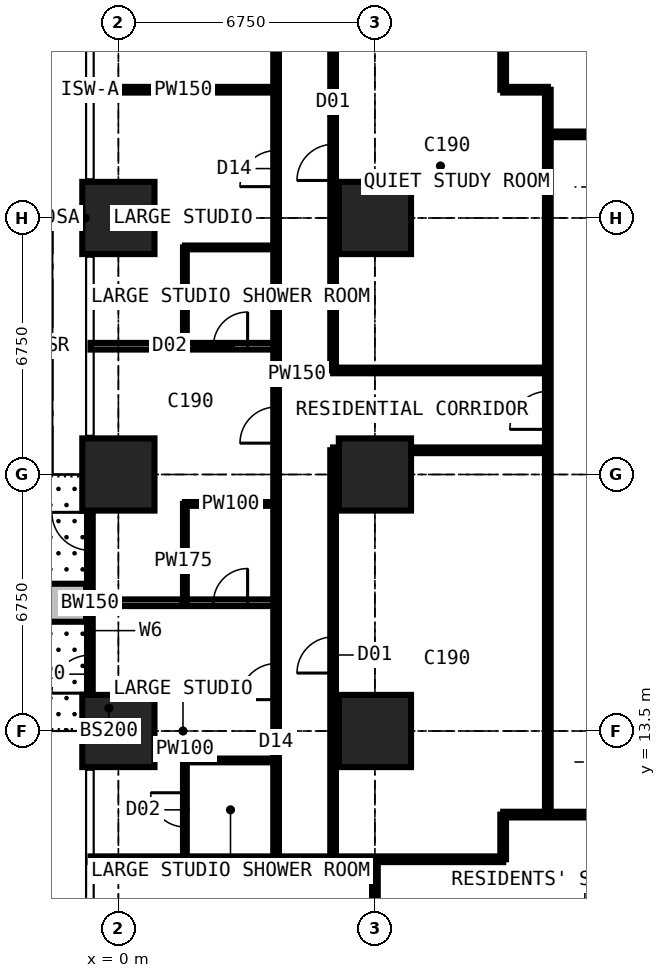
"""IFC4 building model, lengths in metres.
Left out: names, types, materials, properties, quantities, classifications, styles, units other than length and angle.
Written with IfcOpenShell. Run it as: python <this file> out.ifc"""

import sys

from ifc_helpers import new_model, si_unit, direction, frame, frame_2d, origin, origin_2d, place, context, subcontext, project, spatial, rectangle, extrude, element, fill, save


model = new_model("IFC4")
c1 = context("Model", 3, precision=1e-05, world=origin(), true_north=direction((0.0, 1.0)))
c2 = subcontext(c1, "Body", "Model", "MODEL_VIEW")
j1 = project(units=[si_unit("LENGTHUNIT", "METRE"), si_unit("PLANEANGLEUNIT", "RADIAN")], contexts=[c1])
p1 = place(None, origin())
s1 = spatial("IfcSite", under=j1, at=p1, CompositionType="ELEMENT")
p2 = place(p1, origin())
s2 = spatial("IfcBuilding", under=s1, at=p2, CompositionType="ELEMENT")
p3 = place(p2, frame((0.0, 0.0, 39.6)))
s3 = spatial("IfcBuildingStorey", under=s2, at=p3, CompositionType="ELEMENT", Elevation=39.6)
for number, where, z_axis, x_axis in (
    (1, (0.0, 13.5, 0.0), (0.0, 0.0, 1.0), (1.0, 0.0, 0.0)),
    (2, (0.0, 20.25, 0.0), (0.0, 0.0, 1.0), (1.0, 0.0, 0.0)),
    (3, (0.0, 27.0, 0.0), (0.0, 0.0, 1.0), (1.0, 0.0, 0.0)),
    (4, (6.75, 13.5, 0.0), (0.0, 0.0, 1.0), (1.0, 0.0, 0.0)),
    (5, (6.75, 20.25, 0.0), (0.0, 0.0, 1.0), (1.0, 0.0, 0.0)),
    (6, (6.75, 27.0, 0.0), (0.0, 0.0, 1.0), (1.0, 0.0, 0.0)),
):
    element("IfcColumn", number, at=place(p3, frame(where, z_axis=z_axis, x_axis=x_axis)), inside=s3, PredefinedType="COLUMN", context=c2, shape_type="SweptSolid", body=[
        extrude(rectangle(XDim=1.9, YDim=1.9, at=origin_2d()), origin(), (0.0, 0.0, 1.0), 3.6),
    ])
p4 = place(p3, frame((-0.75, 13.5, 0.0), z_axis=(0.0, 0.0, 1.0), x_axis=(0.0, 1.0, 0.0)))
e7 = element("IfcWall", 7, at=p4, inside=s3, PredefinedType="SOLIDWALL", context=c2, shape_type="SweptSolid", body=[
    extrude(rectangle(XDim=6.75, YDim=0.15, at=frame_2d((3.375, 0.0))), origin(), (0.0, 0.0, 1.0), 3.375),
])
p5 = place(p4, frame((0.996, 0.0, 0.0)))
e8 = element("IfcOpeningElement", 8, at=p5, cuts=e7, PredefinedType="OPENING", context=c2, shape_type="SweptSolid", body=[
    extrude(rectangle(XDim=1.0, YDim=2.2, at=frame_2d((0.5, 1.1))), frame((0.0, 0.085, 0.0), z_axis=(0.0, -1.0, 0.0), x_axis=(1.0, 0.0, 0.0)), (0.0, 0.0, 1.0), 0.17),
])
p6 = place(p4, frame((2.042, 0.0, 0.9)))
e9 = element("IfcOpeningElement", 9, at=p6, cuts=e7, PredefinedType="OPENING", context=c2, shape_type="SweptSolid", body=[
    extrude(rectangle(XDim=1.2, YDim=1.8, at=frame_2d((0.6, 0.9))), frame((0.0, 0.085, 0.0), z_axis=(0.0, -1.0, 0.0), x_axis=(1.0, 0.0, 0.0)), (0.0, 0.0, 1.0), 0.17),
])
p7 = place(p4, frame((4.754, 0.0, 0.0)))
e10 = element("IfcOpeningElement", 10, at=p7, cuts=e7, PredefinedType="OPENING", context=c2, shape_type="SweptSolid", body=[
    extrude(rectangle(XDim=1.0, YDim=2.2, at=frame_2d((0.5, 1.1))), frame((0.0, 0.085, 0.0), z_axis=(0.0, -1.0, 0.0), x_axis=(1.0, 0.0, 0.0)), (0.0, 0.0, 1.0), 0.17),
])
p8 = place(p4, frame((3.508, 0.0, 0.9)))
e11 = element("IfcOpeningElement", 11, at=p8, cuts=e7, PredefinedType="OPENING", context=c2, shape_type="SweptSolid", body=[
    extrude(rectangle(XDim=1.2, YDim=1.8, at=frame_2d((0.6, 0.9))), frame((0.0, 0.085, 0.0), z_axis=(0.0, -1.0, 0.0), x_axis=(1.0, 0.0, 0.0)), (0.0, 0.0, 1.0), 0.17),
])
p9 = place(p3, frame((-0.85, 16.875, 0.0), z_axis=(0.0, 0.0, 1.0), x_axis=(-1.0, 0.0, 0.0)))
e12 = element("IfcWall", 12, at=p9, inside=s3, PredefinedType="USERDEFINED", context=c2, shape_type="SweptSolid", body=[
    extrude(rectangle(XDim=2.2, YDim=1.0, at=frame_2d((1.1, 0.0))), origin(), (0.0, 0.0, 1.0), 0.9),
])
p10 = place(p3, frame((-0.734, 10.125, 0.0), z_axis=(0.0, 0.0, 1.0), x_axis=(1.0, 0.0, 0.0)))
e13 = element("IfcWall", 13, at=p10, inside=s3, PredefinedType="PARTITIONING", context=c2, shape_type="SweptSolid", body=[
    extrude(rectangle(XDim=10.859, YDim=0.15, at=frame_2d((5.429, 0.0))), origin(), (0.0, 0.0, 1.0), 3.375),
])
p11 = place(p3, frame((-0.734, 16.875, 0.0), z_axis=(0.0, 0.0, 1.0), x_axis=(1.0, 0.0, 0.0)))
e14 = element("IfcWall", 14, at=p11, inside=s3, PredefinedType="PARTITIONING", context=c2, shape_type="SweptSolid", body=[
    extrude(rectangle(XDim=4.884, YDim=0.175, at=frame_2d((2.442, 0.0))), origin(), (0.0, 0.0, 1.0), 3.375),
])
p12 = place(p11, frame((3.234, 0.0, 0.0)))
e15 = element("IfcOpeningElement", 15, at=p12, cuts=e14, PredefinedType="OPENING", context=c2, shape_type="SweptSolid", body=[
    extrude(rectangle(XDim=0.9, YDim=2.2, at=frame_2d((0.45, 1.1))), frame((0.0, 0.097, 0.0), z_axis=(0.0, -1.0, 0.0), x_axis=(1.0, 0.0, 0.0)), (0.0, 0.0, 1.0), 0.195),
])
p13 = place(p3, frame((-0.734, 23.625, 0.0), z_axis=(0.0, 0.0, 1.0), x_axis=(1.0, 0.0, 0.0)))
e16 = element("IfcWall", 16, at=p13, inside=s3, PredefinedType="PARTITIONING", context=c2, shape_type="SweptSolid", body=[
    extrude(rectangle(XDim=4.884, YDim=0.175, at=frame_2d((2.442, 0.0))), origin(), (0.0, 0.0, 1.0), 3.375),
])
p14 = place(p13, frame((3.234, 0.0, 0.0)))
e17 = element("IfcOpeningElement", 17, at=p14, cuts=e16, PredefinedType="OPENING", context=c2, shape_type="SweptSolid", body=[
    extrude(rectangle(XDim=0.9, YDim=2.2, at=frame_2d((0.45, 1.1))), frame((0.0, 0.097, 0.0), z_axis=(0.0, -1.0, 0.0), x_axis=(1.0, 0.0, 0.0)), (0.0, 0.0, 1.0), 0.195),
])
p15 = place(p3, frame((-0.734, 30.375, 0.0), z_axis=(0.0, 0.0, 1.0), x_axis=(1.0, 0.0, 0.0)))
e18 = element("IfcWall", 18, at=p15, inside=s3, PredefinedType="PARTITIONING", context=c2, shape_type="SweptSolid", body=[
    extrude(rectangle(XDim=4.884, YDim=0.15, at=frame_2d((2.442, 0.0))), origin(), (0.0, 0.0, 1.0), 3.375),
])
p16 = place(p3, frame((1.75, 10.125, 0.0), z_axis=(0.0, 0.0, 1.0), x_axis=(0.0, 1.0, 0.0)))
e19 = element("IfcWall", 19, at=p16, inside=s3, PredefinedType="PARTITIONING", context=c2, shape_type="SweptSolid", body=[
    extrude(rectangle(XDim=2.6, YDim=0.1, at=frame_2d((1.3, 0.0))), origin(), (0.0, 0.0, 1.0), 3.375),
])
p17 = place(p16, frame((0.85, 0.0, 0.0)))
e20 = element("IfcOpeningElement", 20, at=p17, cuts=e19, PredefinedType="OPENING", context=c2, shape_type="SweptSolid", body=[
    extrude(rectangle(XDim=0.9, YDim=2.2, at=frame_2d((0.45, 1.1))), frame((0.0, 0.06, 0.0), z_axis=(0.0, -1.0, 0.0), x_axis=(1.0, 0.0, 0.0)), (0.0, 0.0, 1.0), 0.12),
])
p18 = place(p3, frame((1.75, 12.725, 0.0), z_axis=(0.0, 0.0, 1.0), x_axis=(1.0, 0.0, 0.0)))
e21 = element("IfcWall", 21, at=p18, inside=s3, PredefinedType="PARTITIONING", context=c2, shape_type="SweptSolid", body=[
    extrude(rectangle(XDim=2.4, YDim=0.1, at=frame_2d((1.2, 0.0))), origin(), (0.0, 0.0, 1.0), 3.375),
])
p19 = place(p3, frame((1.75, 16.875, 0.0), z_axis=(0.0, 0.0, 1.0), x_axis=(0.0, 1.0, 0.0)))
e22 = element("IfcWall", 22, at=p19, inside=s3, PredefinedType="PARTITIONING", context=c2, shape_type="SweptSolid", body=[
    extrude(rectangle(XDim=2.6, YDim=0.1, at=frame_2d((1.3, 0.0))), origin(), (0.0, 0.0, 1.0), 3.375),
])
p20 = place(p3, frame((1.75, 19.475, 0.0), z_axis=(0.0, 0.0, 1.0), x_axis=(1.0, 0.0, 0.0)))
e23 = element("IfcWall", 23, at=p20, inside=s3, PredefinedType="PARTITIONING", context=c2, shape_type="SweptSolid", body=[
    extrude(rectangle(XDim=2.4, YDim=0.1, at=frame_2d((1.2, 0.0))), origin(), (0.0, 0.0, 1.0), 3.375),
])
p21 = place(p3, frame((1.75, 23.625, 0.0), z_axis=(0.0, 0.0, 1.0), x_axis=(0.0, 1.0, 0.0)))
e24 = element("IfcWall", 24, at=p21, inside=s3, PredefinedType="PARTITIONING", context=c2, shape_type="SweptSolid", body=[
    extrude(rectangle(XDim=2.6, YDim=0.1, at=frame_2d((1.3, 0.0))), origin(), (0.0, 0.0, 1.0), 3.375),
])
p22 = place(p3, frame((1.75, 26.225, 0.0), z_axis=(0.0, 0.0, 1.0), x_axis=(1.0, 0.0, 0.0)))
e25 = element("IfcWall", 25, at=p22, inside=s3, PredefinedType="PARTITIONING", context=c2, shape_type="SweptSolid", body=[
    extrude(rectangle(XDim=2.4, YDim=0.1, at=frame_2d((1.2, 0.0))), origin(), (0.0, 0.0, 1.0), 3.375),
])
p23 = place(p3, frame((4.15, 10.125, 0.0), z_axis=(0.0, 0.0, 1.0), x_axis=(0.0, 1.0, 0.0)))
e26 = element("IfcWall", 26, at=p23, inside=s3, PredefinedType="PARTITIONING", context=c2, shape_type="SweptSolid", body=[
    extrude(rectangle(XDim=23.625, YDim=0.15, at=frame_2d((11.812, 0.0))), origin(), (0.0, 0.0, 1.0), 3.375),
])
p24 = place(p23, frame((4.2, 0.0, 0.0)))
e27 = element("IfcOpeningElement", 27, at=p24, cuts=e26, PredefinedType="OPENING", context=c2, shape_type="SweptSolid", body=[
    extrude(rectangle(XDim=0.95, YDim=2.2, at=frame_2d((0.475, 1.1))), frame((0.0, 0.085, 0.0), z_axis=(0.0, -1.0, 0.0), x_axis=(1.0, 0.0, 0.0)), (0.0, 0.0, 1.0), 0.17),
])
p25 = place(p23, frame((10.95, 0.0, 0.0)))
e28 = element("IfcOpeningElement", 28, at=p25, cuts=e26, PredefinedType="OPENING", context=c2, shape_type="SweptSolid", body=[
    extrude(rectangle(XDim=0.95, YDim=2.2, at=frame_2d((0.475, 1.1))), frame((0.0, 0.085, 0.0), z_axis=(0.0, -1.0, 0.0), x_axis=(1.0, 0.0, 0.0)), (0.0, 0.0, 1.0), 0.17),
])
p26 = place(p23, frame((17.7, 0.0, 0.0)))
e29 = element("IfcOpeningElement", 29, at=p26, cuts=e26, PredefinedType="OPENING", context=c2, shape_type="SweptSolid", body=[
    extrude(rectangle(XDim=0.95, YDim=2.2, at=frame_2d((0.475, 1.1))), frame((0.0, 0.085, 0.0), z_axis=(0.0, -1.0, 0.0), x_axis=(1.0, 0.0, 0.0)), (0.0, 0.0, 1.0), 0.17),
])
p27 = place(p3, frame((5.65, 10.125, 0.0), z_axis=(0.0, 0.0, 1.0), x_axis=(0.0, 1.0, 0.0)))
e30 = element("IfcWall", 30, at=p27, inside=s3, PredefinedType="PARTITIONING", context=c2, shape_type="SweptSolid", body=[
    extrude(rectangle(XDim=10.762, YDim=0.15, at=frame_2d((5.381, 0.0))), origin(), (0.0, 0.0, 1.0), 3.375),
])
p28 = place(p27, frame((4.9, 0.0, 0.0)))
e31 = element("IfcOpeningElement", 31, at=p28, cuts=e30, PredefinedType="OPENING", context=c2, shape_type="SweptSolid", body=[
    extrude(rectangle(XDim=0.95, YDim=2.2, at=frame_2d((0.475, 1.1))), frame((0.0, 0.085, 0.0), z_axis=(0.0, -1.0, 0.0), x_axis=(1.0, 0.0, 0.0)), (0.0, 0.0, 1.0), 0.17),
])
p29 = place(p3, frame((5.65, 20.887, 0.0), z_axis=(0.0, 0.0, 1.0), x_axis=(1.0, 0.0, 0.0)))
e32 = element("IfcWall", 32, at=p29, inside=s3, PredefinedType="PARTITIONING", context=c2, shape_type="SweptSolid", body=[
    extrude(rectangle(XDim=5.65, YDim=0.15, at=frame_2d((2.825, 0.0))), origin(), (0.0, 0.0, 1.0), 3.375),
])
p30 = place(p3, frame((5.65, 22.988, 0.0), z_axis=(0.0, 0.0, 1.0), x_axis=(0.0, 1.0, 0.0)))
e33 = element("IfcWall", 33, at=p30, inside=s3, PredefinedType="PARTITIONING", context=c2, shape_type="SweptSolid", body=[
    extrude(rectangle(XDim=10.762, YDim=0.15, at=frame_2d((5.381, 0.0))), origin(), (0.0, 0.0, 1.0), 3.375),
])
p31 = place(p30, frame((5.0, 0.0, 0.0)))
e34 = element("IfcOpeningElement", 34, at=p31, cuts=e33, PredefinedType="OPENING", context=c2, shape_type="SweptSolid", body=[
    extrude(rectangle(XDim=0.95, YDim=2.2, at=frame_2d((0.475, 1.1))), frame((0.0, 0.085, 0.0), z_axis=(0.0, -1.0, 0.0), x_axis=(1.0, 0.0, 0.0)), (0.0, 0.0, 1.0), 0.17),
])
p32 = place(p3, frame((5.65, 22.988, 0.0), z_axis=(0.0, 0.0, 1.0), x_axis=(1.0, 0.0, 0.0)))
e35 = element("IfcWall", 35, at=p32, inside=s3, PredefinedType="PARTITIONING", context=c2, shape_type="SweptSolid", body=[
    extrude(rectangle(XDim=5.65, YDim=0.15, at=frame_2d((2.825, 0.0))), origin(), (0.0, 0.0, 1.0), 3.375),
])
p33 = place(p3, frame((6.75, 4.15, 0.0), z_axis=(0.0, 0.0, 1.0), x_axis=(0.0, 1.0, 0.0)))
e36 = element("IfcWall", 36, at=p33, inside=s3, PredefinedType="PARTITIONING", context=c2, shape_type="SweptSolid", body=[
    extrude(rectangle(XDim=5.975, YDim=0.15, at=frame_2d((2.988, 0.0))), origin(), (0.0, 0.0, 1.0), 2.877),
])
p34 = place(p3, frame((10.125, 10.125, 0.0), z_axis=(0.0, 0.0, 1.0), x_axis=(0.0, 1.0, 0.0)))
e37 = element("IfcWall", 37, at=p34, inside=s3, PredefinedType="PARTITIONING", context=c2, shape_type="SweptSolid", body=[
    extrude(rectangle(XDim=1.175, YDim=0.15, at=frame_2d((0.587, 0.0))), origin(), (0.0, 0.0, 1.0), 3.375),
])
p35 = place(p3, frame((10.125, 11.3, 0.0), z_axis=(0.0, 0.0, 1.0), x_axis=(1.0, 0.0, 0.0)))
e38 = element("IfcWall", 38, at=p35, inside=s3, PredefinedType="PARTITIONING", context=c2, shape_type="SweptSolid", body=[
    extrude(rectangle(XDim=20.675, YDim=0.15, at=frame_2d((10.337, 0.0))), origin(), (0.0, 0.0, 1.0), 3.375),
])
p36 = place(p35, frame((8.375, 0.0, 0.0)))
e39 = element("IfcOpeningElement", 39, at=p36, cuts=e38, PredefinedType="OPENING", context=c2, shape_type="SweptSolid", body=[
    extrude(rectangle(XDim=1.0, YDim=2.2, at=frame_2d((0.5, 1.1))), frame((0.0, 0.085, 0.0), z_axis=(0.0, -1.0, 0.0), x_axis=(1.0, 0.0, 0.0)), (0.0, 0.0, 1.0), 0.17),
])
p37 = place(p35, frame((10.975, 0.0, 0.0)))
e40 = element("IfcOpeningElement", 40, at=p37, cuts=e38, PredefinedType="OPENING", context=c2, shape_type="SweptSolid", body=[
    extrude(rectangle(XDim=1.0, YDim=2.2, at=frame_2d((0.5, 1.1))), frame((0.0, 0.085, 0.0), z_axis=(0.0, -1.0, 0.0), x_axis=(1.0, 0.0, 0.0)), (0.0, 0.0, 1.0), 0.17),
])
p38 = place(p35, frame((3.925, 0.0, 0.0)))
e41 = element("IfcOpeningElement", 41, at=p38, cuts=e38, PredefinedType="OPENING", context=c2, shape_type="SweptSolid", body=[
    extrude(rectangle(XDim=0.95, YDim=2.2, at=frame_2d((0.475, 1.1))), frame((0.0, 0.085, 0.0), z_axis=(0.0, -1.0, 0.0), x_axis=(1.0, 0.0, 0.0)), (0.0, 0.0, 1.0), 0.17),
])
p39 = place(p3, frame((10.125, 30.375, 0.0), z_axis=(0.0, 0.0, 1.0), x_axis=(0.0, 1.0, 0.0)))
e42 = element("IfcWall", 42, at=p39, inside=s3, PredefinedType="PARTITIONING", context=c2, shape_type="SweptSolid", body=[
    extrude(rectangle(XDim=10.859, YDim=0.15, at=frame_2d((5.429, 0.0))), origin(), (0.0, 0.0, 1.0), 3.375),
])
p40 = place(p39, frame((4.725, 0.0, 0.0)))
e43 = element("IfcOpeningElement", 43, at=p40, cuts=e42, PredefinedType="OPENING", context=c2, shape_type="SweptSolid", body=[
    extrude(rectangle(XDim=1.0, YDim=2.2, at=frame_2d((0.5, 1.1))), frame((0.0, 0.085, 0.0), z_axis=(0.0, -1.0, 0.0), x_axis=(1.0, 0.0, 0.0)), (0.0, 0.0, 1.0), 0.17),
])
p41 = place(p3, frame((10.125, 30.375, 0.0), z_axis=(0.0, 0.0, 1.0), x_axis=(1.0, 0.0, 0.0)))
e44 = element("IfcWall", 44, at=p41, inside=s3, PredefinedType="PARTITIONING", context=c2, shape_type="SweptSolid", body=[
    extrude(rectangle(XDim=1.175, YDim=0.15, at=frame_2d((0.587, 0.0))), origin(), (0.0, 0.0, 1.0), 3.375),
])
p42 = place(p3, frame((11.3, 11.3, 0.0), z_axis=(0.0, 0.0, 1.0), x_axis=(0.0, 1.0, 0.0)))
e45 = element("IfcWall", 45, at=p42, inside=s3, PredefinedType="PARTITIONING", context=c2, shape_type="SweptSolid", body=[
    extrude(rectangle(XDim=19.075, YDim=0.15, at=frame_2d((9.538, 0.0))), origin(), (0.0, 0.0, 1.0), 3.375),
])
p43 = place(p42, frame((10.137, 0.0, 0.0)))
e46 = element("IfcOpeningElement", 46, at=p43, cuts=e45, PredefinedType="OPENING", context=c2, shape_type="SweptSolid", body=[
    extrude(rectangle(XDim=1.0, YDim=2.2, at=frame_2d((0.5, 1.1))), frame((0.0, 0.085, 0.0), z_axis=(0.0, -1.0, 0.0), x_axis=(1.0, 0.0, 0.0)), (0.0, 0.0, 1.0), 0.17),
])
p44 = place(p3, frame((11.3, 29.2, 0.0), z_axis=(0.0, 0.0, 1.0), x_axis=(1.0, 0.0, 0.0)))
e47 = element("IfcWall", 47, at=p44, inside=s3, PredefinedType="PARTITIONING", context=c2, shape_type="SweptSolid", body=[
    extrude(rectangle(XDim=19.075, YDim=0.15, at=frame_2d((9.538, 0.0))), origin(), (0.0, 0.0, 1.0), 3.375),
])
p45 = place(p44, frame((10.137, 0.0, 0.0)))
e48 = element("IfcOpeningElement", 48, at=p45, cuts=e47, PredefinedType="OPENING", context=c2, shape_type="SweptSolid", body=[
    extrude(rectangle(XDim=1.0, YDim=2.2, at=frame_2d((0.5, 1.1))), frame((0.0, 0.085, 0.0), z_axis=(0.0, -1.0, 0.0), x_axis=(1.0, 0.0, 0.0)), (0.0, 0.0, 1.0), 0.17),
])
p46 = place(p5, origin())
e49 = element("IfcDoor", 49, at=p46, inside=s3, OperationType="SINGLE_SWING_LEFT", PredefinedType="DOOR", context=c2, shape_type="SweptSolid", body=[
    extrude(rectangle(XDim=1.0, YDim=2.2, at=frame_2d((0.5, 1.1))), frame((0.0, 0.025, 0.0), z_axis=(0.0, -1.0, 0.0), x_axis=(1.0, 0.0, 0.0)), (0.0, 0.0, 1.0), 0.05),
])
fill(e8, e49)
p47 = place(p6, origin())
e50 = element("IfcWindow", 50, at=p47, inside=s3, PartitioningType="SINGLE_PANEL", PredefinedType="WINDOW", context=c2, shape_type="SweptSolid", body=[
    extrude(rectangle(XDim=1.2, YDim=1.8, at=frame_2d((0.6, 0.9))), frame((0.0, 0.03, 0.0), z_axis=(0.0, -1.0, 0.0), x_axis=(1.0, 0.0, 0.0)), (0.0, 0.0, 1.0), 0.06),
])
fill(e9, e50)
p48 = place(p7, origin())
e51 = element("IfcDoor", 51, at=p48, inside=s3, OperationType="SINGLE_SWING_RIGHT", PredefinedType="DOOR", context=c2, shape_type="SweptSolid", body=[
    extrude(rectangle(XDim=1.0, YDim=2.2, at=frame_2d((0.5, 1.1))), frame((0.0, 0.025, 0.0), z_axis=(0.0, -1.0, 0.0), x_axis=(1.0, 0.0, 0.0)), (0.0, 0.0, 1.0), 0.05),
])
fill(e10, e51)
p49 = place(p8, origin())
e52 = element("IfcWindow", 52, at=p49, inside=s3, PartitioningType="SINGLE_PANEL", PredefinedType="WINDOW", context=c2, shape_type="SweptSolid", body=[
    extrude(rectangle(XDim=1.2, YDim=1.8, at=frame_2d((0.6, 0.9))), frame((0.0, 0.03, 0.0), z_axis=(0.0, -1.0, 0.0), x_axis=(1.0, 0.0, 0.0)), (0.0, 0.0, 1.0), 0.06),
])
fill(e11, e52)
p50 = place(p24, origin())
e53 = element("IfcDoor", 53, at=p50, inside=s3, OperationType="SINGLE_SWING_LEFT", PredefinedType="DOOR", context=c2, shape_type="SweptSolid", body=[
    extrude(rectangle(XDim=0.95, YDim=2.2, at=frame_2d((0.475, 1.1))), frame((0.0, 0.025, 0.0), z_axis=(0.0, -1.0, 0.0), x_axis=(1.0, 0.0, 0.0)), (0.0, 0.0, 1.0), 0.05),
])
fill(e27, e53)
p51 = place(p17, origin())
e54 = element("IfcDoor", 54, at=p51, inside=s3, OperationType="SINGLE_SWING_RIGHT", PredefinedType="DOOR", context=c2, shape_type="SweptSolid", body=[
    extrude(rectangle(XDim=0.9, YDim=2.2, at=frame_2d((0.45, 1.1))), frame((0.0, 0.025, 0.0), z_axis=(0.0, -1.0, 0.0), x_axis=(1.0, 0.0, 0.0)), (0.0, 0.0, 1.0), 0.05),
])
fill(e20, e54)
p52 = place(p25, origin())
e55 = element("IfcDoor", 55, at=p52, inside=s3, OperationType="SINGLE_SWING_LEFT", PredefinedType="DOOR", context=c2, shape_type="SweptSolid", body=[
    extrude(rectangle(XDim=0.95, YDim=2.2, at=frame_2d((0.475, 1.1))), frame((0.0, 0.025, 0.0), z_axis=(0.0, -1.0, 0.0), x_axis=(1.0, 0.0, 0.0)), (0.0, 0.0, 1.0), 0.05),
])
fill(e28, e55)
p53 = place(p12, origin())
e56 = element("IfcDoor", 56, at=p53, inside=s3, OperationType="SINGLE_SWING_RIGHT", PredefinedType="DOOR", context=c2, shape_type="SweptSolid", body=[
    extrude(rectangle(XDim=0.9, YDim=2.2, at=frame_2d((0.45, 1.1))), frame((0.0, 0.025, 0.0), z_axis=(0.0, -1.0, 0.0), x_axis=(1.0, 0.0, 0.0)), (0.0, 0.0, 1.0), 0.05),
])
fill(e15, e56)
p54 = place(p26, origin())
e57 = element("IfcDoor", 57, at=p54, inside=s3, OperationType="SINGLE_SWING_LEFT", PredefinedType="DOOR", context=c2, shape_type="SweptSolid", body=[
    extrude(rectangle(XDim=0.95, YDim=2.2, at=frame_2d((0.475, 1.1))), frame((0.0, 0.025, 0.0), z_axis=(0.0, -1.0, 0.0), x_axis=(1.0, 0.0, 0.0)), (0.0, 0.0, 1.0), 0.05),
])
fill(e29, e57)
p55 = place(p14, origin())
e58 = element("IfcDoor", 58, at=p55, inside=s3, OperationType="SINGLE_SWING_RIGHT", PredefinedType="DOOR", context=c2, shape_type="SweptSolid", body=[
    extrude(rectangle(XDim=0.9, YDim=2.2, at=frame_2d((0.45, 1.1))), frame((0.0, 0.025, 0.0), z_axis=(0.0, -1.0, 0.0), x_axis=(1.0, 0.0, 0.0)), (0.0, 0.0, 1.0), 0.05),
])
fill(e17, e58)
p56 = place(p43, origin())
e59 = element("IfcDoor", 59, at=p56, inside=s3, OperationType="SINGLE_SWING_LEFT", PredefinedType="DOOR", context=c2, shape_type="SweptSolid", body=[
    extrude(rectangle(XDim=1.0, YDim=2.2, at=frame_2d((0.5, 1.1))), frame((0.0, 0.025, 0.0), z_axis=(0.0, -1.0, 0.0), x_axis=(1.0, 0.0, 0.0)), (0.0, 0.0, 1.0), 0.05),
])
fill(e46, e59)
p57 = place(p28, origin())
e60 = element("IfcDoor", 60, at=p57, inside=s3, OperationType="SINGLE_SWING_LEFT", PredefinedType="DOOR", context=c2, shape_type="SweptSolid", body=[
    extrude(rectangle(XDim=0.95, YDim=2.2, at=frame_2d((0.475, 1.1))), frame((0.0, 0.025, 0.0), z_axis=(0.0, -1.0, 0.0), x_axis=(1.0, 0.0, 0.0)), (0.0, 0.0, 1.0), 0.05),
])
fill(e31, e60)
p58 = place(p31, origin())
e61 = element("IfcDoor", 61, at=p58, inside=s3, OperationType="SINGLE_SWING_LEFT", PredefinedType="DOOR", context=c2, shape_type="SweptSolid", body=[
    extrude(rectangle(XDim=0.95, YDim=2.2, at=frame_2d((0.475, 1.1))), frame((0.0, 0.025, 0.0), z_axis=(0.0, -1.0, 0.0), x_axis=(1.0, 0.0, 0.0)), (0.0, 0.0, 1.0), 0.05),
])
fill(e34, e61)
save(model, sys.argv[1])
